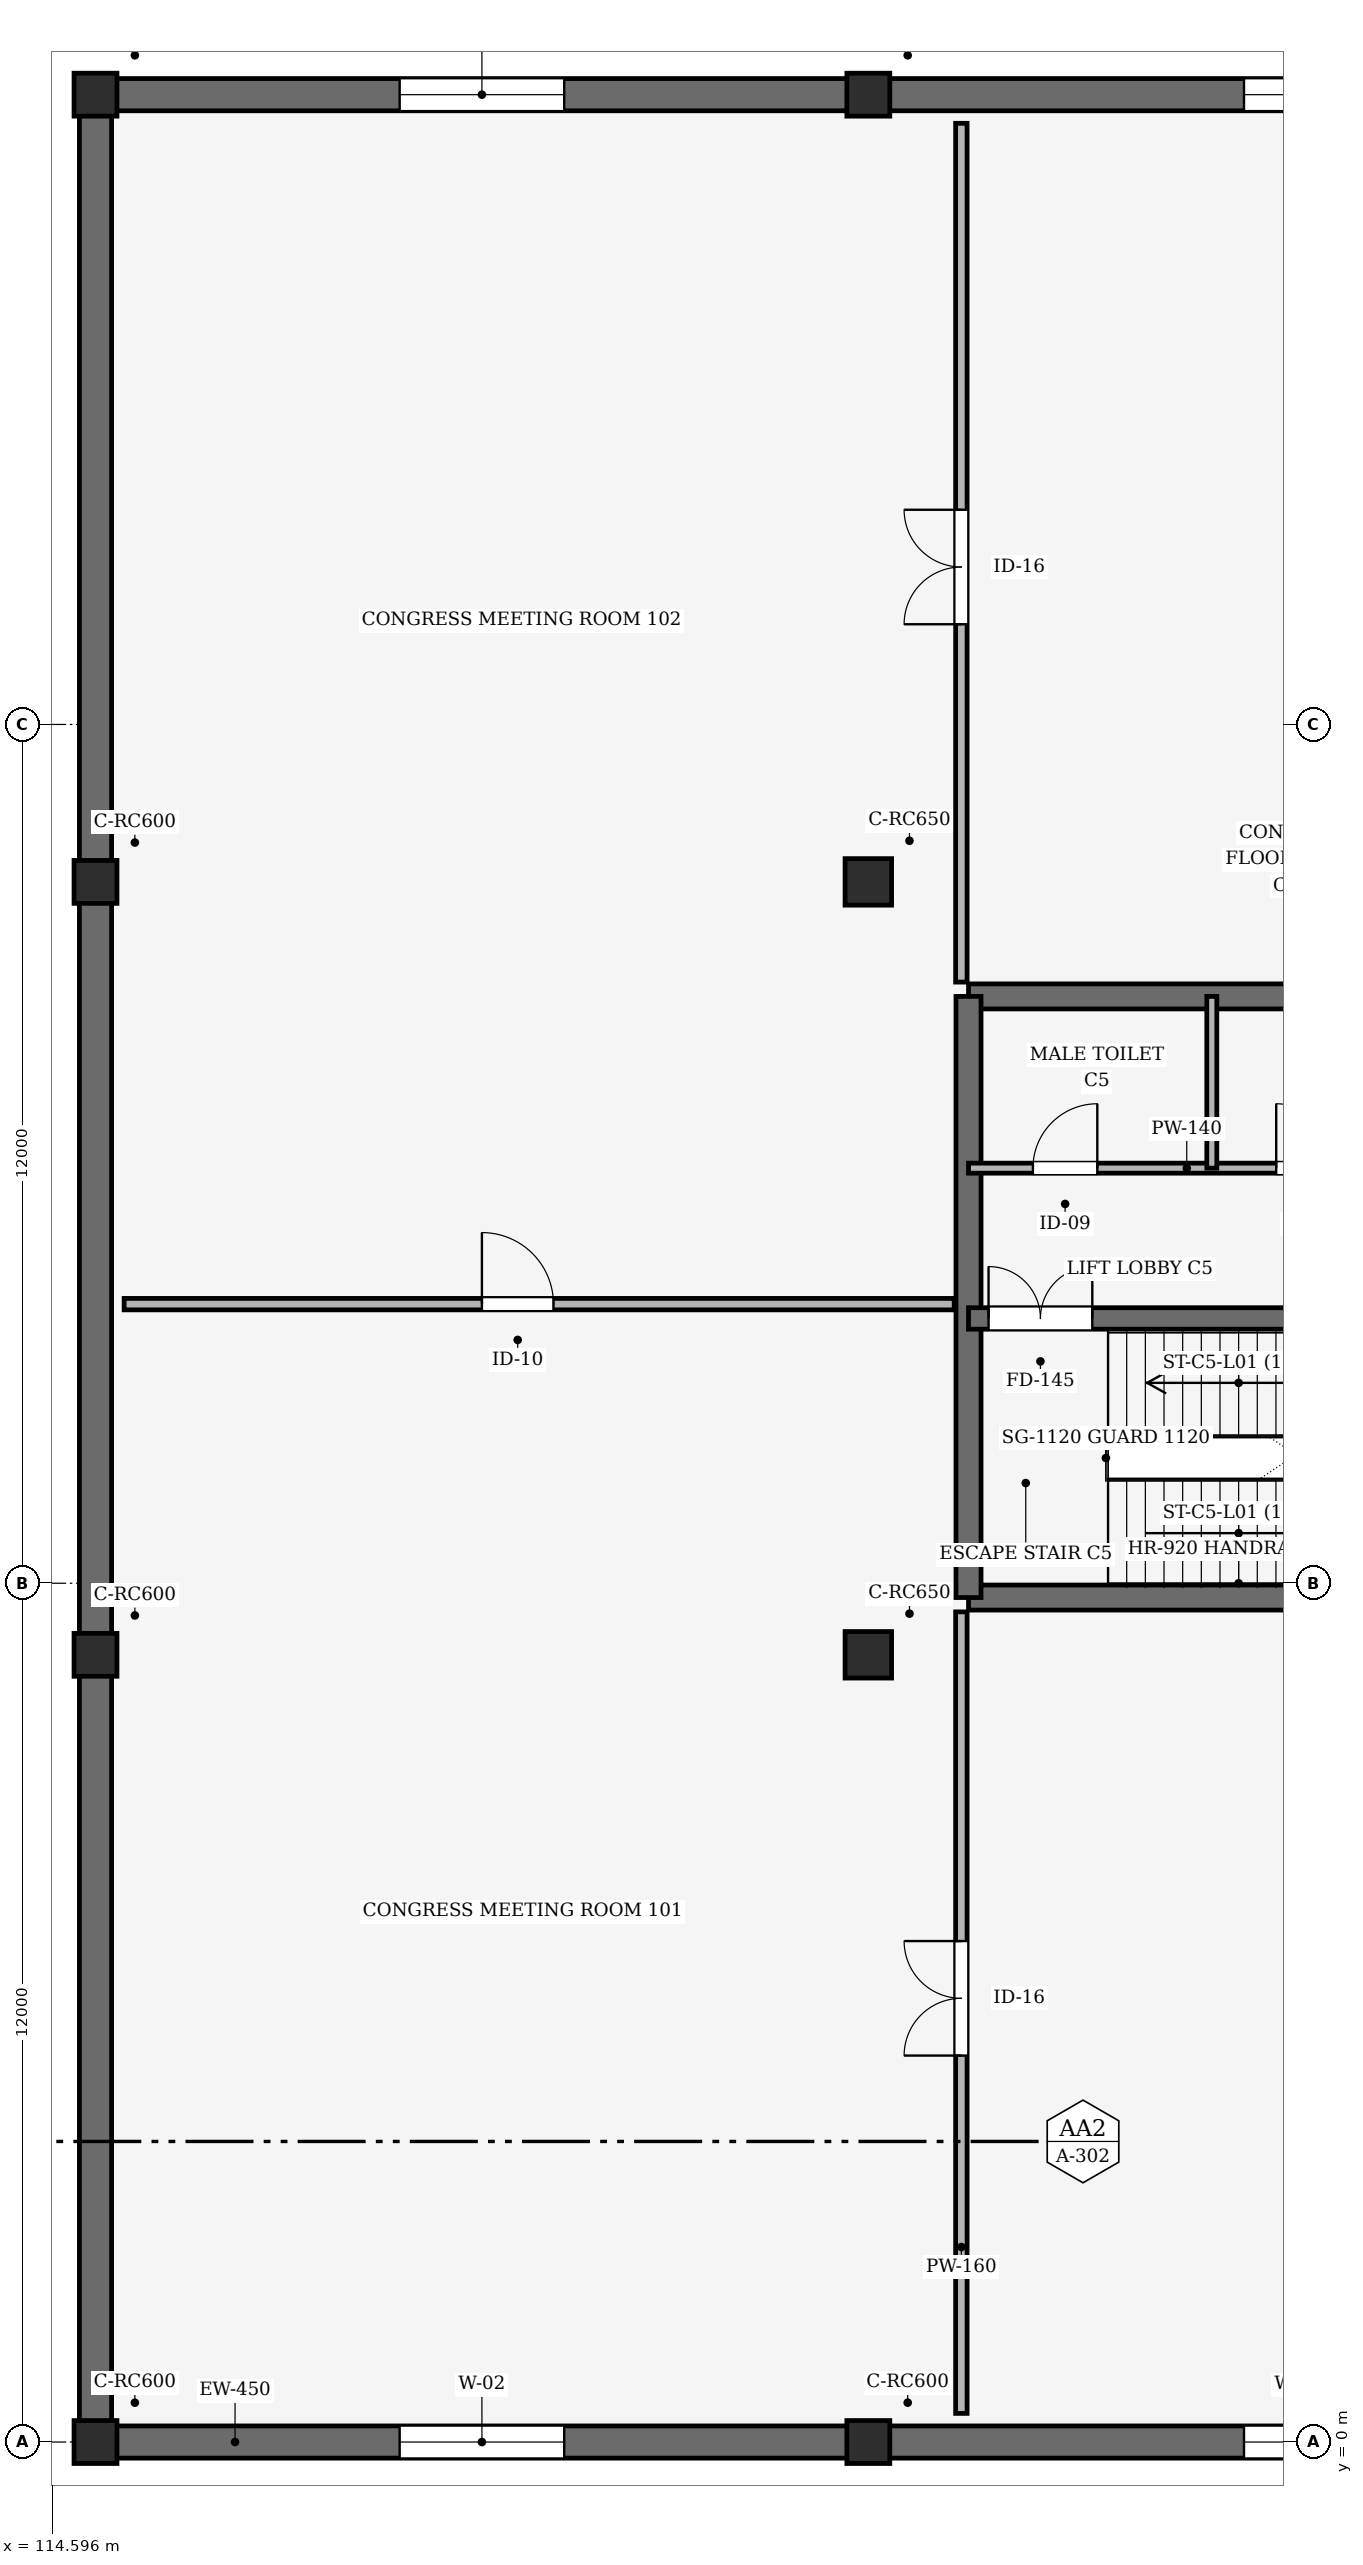
"""IFC4 building model, lengths in metres.
Left out: names, types, materials, properties, quantities, classifications, styles, units other than length and angle.
Written with IfcOpenShell. Run it as: python <this file> out.ifc"""

import sys

from ifc_helpers import new_model, si_unit, direction, frame, frame_2d, origin, origin_2d, place, context, subcontext, project, spatial, rectangle, extrude, element, fill, save


model = new_model("IFC4")
c1 = context("Model", 3, precision=1e-05, world=origin(), true_north=direction((0.0, 1.0)))
c2 = subcontext(c1, "Body", "Model", "MODEL_VIEW")
j1 = project(units=[si_unit("LENGTHUNIT", "METRE"), si_unit("PLANEANGLEUNIT", "RADIAN")], contexts=[c1])
p1 = place(None, origin())
s1 = spatial("IfcSite", under=j1, at=p1, CompositionType="ELEMENT")
p2 = place(p1, origin())
s2 = spatial("IfcBuilding", under=s1, at=p2, CompositionType="ELEMENT")
p3 = place(p2, frame((0.0, 0.0, 5.4)))
s3 = spatial("IfcBuildingStorey", under=s2, at=p3, CompositionType="ELEMENT", Elevation=5.4)
for number, where, z_axis, x_axis in (
    (1, (115.2, 0.0, 0.0), (0.0, 0.0, 1.0), (1.0, 0.0, 0.0)),
    (2, (115.2, 11.0, 0.0), (0.0, 0.0, 1.0), (1.0, 0.0, 0.0)),
    (3, (115.2, 21.8, 0.0), (0.0, 0.0, 1.0), (1.0, 0.0, 0.0)),
    (4, (115.2, 32.8, 0.0), (0.0, 0.0, 1.0), (1.0, 0.0, 0.0)),
    (5, (126.0, 0.0, 0.0), (0.0, 0.0, 1.0), (1.0, 0.0, 0.0)),
):
    element("IfcColumn", number, at=place(p3, frame(where, z_axis=z_axis, x_axis=x_axis)), inside=s3, PredefinedType="COLUMN", context=c2, shape_type="SweptSolid", body=[
        extrude(rectangle(XDim=0.6, YDim=0.6, at=origin_2d()), origin(), (0.0, 0.0, 1.0), 5.4),
    ])
for number, where, z_axis, x_axis in (
    (6, (126.0, 11.0, 0.0), (0.0, 0.0, 1.0), (1.0, 0.0, 0.0)),
    (7, (126.0, 21.8, 0.0), (0.0, 0.0, 1.0), (1.0, 0.0, 0.0)),
):
    element("IfcColumn", number, at=place(p3, frame(where, z_axis=z_axis, x_axis=x_axis)), inside=s3, PredefinedType="COLUMN", context=c2, shape_type="SweptSolid", body=[
        extrude(rectangle(XDim=0.65, YDim=0.65, at=origin_2d()), origin(), (0.0, 0.0, 1.0), 5.4),
    ])
p4 = place(p3, frame((126.0, 32.8, 0.0), z_axis=(0.0, 0.0, 1.0), x_axis=(1.0, 0.0, 0.0)))
e8 = element("IfcColumn", 8, at=p4, inside=s3, PredefinedType="COLUMN", context=c2, shape_type="SweptSolid", body=[
    extrude(rectangle(XDim=0.6, YDim=0.6, at=origin_2d()), origin(), (0.0, 0.0, 1.0), 5.4),
])
p5 = place(p3, frame((115.2, 0.0, 0.0), z_axis=(0.0, 0.0, 1.0), x_axis=(1.0, 0.0, 0.0)))
e9 = element("IfcWall", 9, at=p5, inside=s3, PredefinedType="SOLIDWALL", context=c2, shape_type="SweptSolid", body=[
    extrude(rectangle(XDim=10.8, YDim=0.45, at=frame_2d((5.4, 0.0))), origin(), (0.0, 0.0, 1.0), 4.3),
])
p6 = place(p5, frame((4.25, 0.0, 0.9)))
e10 = element("IfcOpeningElement", 10, at=p6, cuts=e9, PredefinedType="OPENING", context=c2, shape_type="SweptSolid", body=[
    extrude(rectangle(XDim=2.3, YDim=3.1, at=frame_2d((1.15, 1.55))), frame((0.0, 0.235, 0.0), z_axis=(0.0, -1.0, 0.0), x_axis=(1.0, 0.0, 0.0)), (0.0, 0.0, 1.0), 0.47),
])
p7 = place(p3, frame((126.0, 32.8, 0.0), z_axis=(0.0, 0.0, 1.0), x_axis=(-1.0, 0.0, 0.0)))
e11 = element("IfcWall", 11, at=p7, inside=s3, PredefinedType="SOLIDWALL", context=c2, shape_type="SweptSolid", body=[
    extrude(rectangle(XDim=10.8, YDim=0.45, at=frame_2d((5.4, 0.0))), origin(), (0.0, 0.0, 1.0), 4.3),
])
p8 = place(p7, frame((4.25, 0.0, 0.9)))
e12 = element("IfcOpeningElement", 12, at=p8, cuts=e11, PredefinedType="OPENING", context=c2, shape_type="SweptSolid", body=[
    extrude(rectangle(XDim=2.3, YDim=3.1, at=frame_2d((1.15, 1.55))), frame((0.0, 0.235, 0.0), z_axis=(0.0, -1.0, 0.0), x_axis=(1.0, 0.0, 0.0)), (0.0, 0.0, 1.0), 0.47),
])
p9 = place(p3, frame((126.0, 0.0, 0.0), z_axis=(0.0, 0.0, 1.0), x_axis=(1.0, 0.0, 0.0)))
e13 = element("IfcWall", 13, at=p9, inside=s3, PredefinedType="SOLIDWALL", context=c2, shape_type="SweptSolid", body=[
    extrude(rectangle(XDim=12.0, YDim=0.45, at=frame_2d((6.0, 0.0))), origin(), (0.0, 0.0, 1.0), 4.3),
])
p10 = place(p9, frame((5.25, 0.0, 0.9)))
e14 = element("IfcOpeningElement", 14, at=p10, cuts=e13, PredefinedType="OPENING", context=c2, shape_type="SweptSolid", body=[
    extrude(rectangle(XDim=1.5, YDim=2.15, at=frame_2d((0.75, 1.075))), frame((0.0, 0.235, 0.0), z_axis=(0.0, -1.0, 0.0), x_axis=(1.0, 0.0, 0.0)), (0.0, 0.0, 1.0), 0.47),
])
p11 = place(p3, frame((138.0, 32.8, 0.0), z_axis=(0.0, 0.0, 1.0), x_axis=(-1.0, 0.0, 0.0)))
e15 = element("IfcWall", 15, at=p11, inside=s3, PredefinedType="SOLIDWALL", context=c2, shape_type="SweptSolid", body=[
    extrude(rectangle(XDim=12.0, YDim=0.45, at=frame_2d((6.0, 0.0))), origin(), (0.0, 0.0, 1.0), 4.3),
])
p12 = place(p11, frame((5.25, 0.0, 0.9)))
e16 = element("IfcOpeningElement", 16, at=p12, cuts=e15, PredefinedType="OPENING", context=c2, shape_type="SweptSolid", body=[
    extrude(rectangle(XDim=1.5, YDim=2.15, at=frame_2d((0.75, 1.075))), frame((0.0, 0.235, 0.0), z_axis=(0.0, -1.0, 0.0), x_axis=(1.0, 0.0, 0.0)), (0.0, 0.0, 1.0), 0.47),
])
p13 = place(p3, frame((115.2, 11.0, 0.0), z_axis=(0.0, 0.0, 1.0), x_axis=(0.0, -1.0, 0.0)))
e17 = element("IfcWall", 17, at=p13, inside=s3, PredefinedType="SOLIDWALL", context=c2, shape_type="SweptSolid", body=[
    extrude(rectangle(XDim=11.0, YDim=0.45, at=frame_2d((5.5, 0.0))), origin(), (0.0, 0.0, 1.0), 4.3),
])
p14 = place(p3, frame((115.2, 21.8, 0.0), z_axis=(0.0, 0.0, 1.0), x_axis=(0.0, -1.0, 0.0)))
e18 = element("IfcWall", 18, at=p14, inside=s3, PredefinedType="SOLIDWALL", context=c2, shape_type="SweptSolid", body=[
    extrude(rectangle(XDim=10.8, YDim=0.45, at=frame_2d((5.4, 0.0))), origin(), (0.0, 0.0, 1.0), 4.3),
])
p15 = place(p3, frame((115.2, 32.8, 0.0), z_axis=(0.0, 0.0, 1.0), x_axis=(0.0, -1.0, 0.0)))
e19 = element("IfcWall", 19, at=p15, inside=s3, PredefinedType="SOLIDWALL", context=c2, shape_type="SweptSolid", body=[
    extrude(rectangle(XDim=11.0, YDim=0.45, at=frame_2d((5.5, 0.0))), origin(), (0.0, 0.0, 1.0), 4.3),
])
for number, where, z_axis, x_axis in (
    (20, (127.4, 11.8, 0.0), (0.0, 0.0, 1.0), (1.0, 0.0, 0.0)),
    (21, (137.6, 20.2, 0.0), (0.0, 0.0, 1.0), (-1.0, 0.0, 0.0)),
):
    element("IfcWall", number, at=place(p3, frame(where, z_axis=z_axis, x_axis=x_axis)), inside=s3, PredefinedType="SHEAR", context=c2, shape_type="SweptSolid", body=[
        extrude(rectangle(XDim=10.2, YDim=0.35, at=frame_2d((5.1, 0.0))), origin(), (0.0, 0.0, 1.0), 5.4),
    ])
p16 = place(p3, frame((127.4, 20.2, 0.0), z_axis=(0.0, 0.0, 1.0), x_axis=(0.0, -1.0, 0.0)))
e22 = element("IfcWall", 22, at=p16, inside=s3, PredefinedType="SHEAR", context=c2, shape_type="SweptSolid", body=[
    extrude(rectangle(XDim=8.4, YDim=0.35, at=frame_2d((4.2, 0.0))), origin(), (0.0, 0.0, 1.0), 5.4),
])
p17 = place(p3, frame((127.4, 15.7, 0.0), z_axis=(0.0, 0.0, 1.0), x_axis=(1.0, 0.0, 0.0)))
e23 = element("IfcWall", 23, at=p17, inside=s3, PredefinedType="SHEAR", context=c2, shape_type="SweptSolid", body=[
    extrude(rectangle(XDim=10.2, YDim=0.3, at=frame_2d((5.1, 0.0))), origin(), (0.0, 0.0, 1.0), 5.4),
])
p18 = place(p17, frame((0.28, 0.0, 0.0)))
e24 = element("IfcOpeningElement", 24, at=p18, cuts=e23, PredefinedType="OPENING", context=c2, shape_type="SweptSolid", body=[
    extrude(rectangle(XDim=1.45, YDim=2.15, at=frame_2d((0.725, 1.075))), frame((0.0, 0.16, 0.0), z_axis=(0.0, -1.0, 0.0), x_axis=(1.0, 0.0, 0.0)), (0.0, 0.0, 1.0), 0.32),
])
p19 = place(p17, frame((8.225, 0.0, 0.0)))
e25 = element("IfcOpeningElement", 25, at=p19, cuts=e23, PredefinedType="OPENING", context=c2, shape_type="SweptSolid", body=[
    extrude(rectangle(XDim=1.1, YDim=2.15, at=frame_2d((0.55, 1.075))), frame((0.0, 0.16, 0.0), z_axis=(0.0, -1.0, 0.0), x_axis=(1.0, 0.0, 0.0)), (0.0, 0.0, 1.0), 0.32),
])
p20 = place(p3, frame((127.4, 17.8, 0.0), z_axis=(0.0, 0.0, 1.0), x_axis=(1.0, 0.0, 0.0)))
e26 = element("IfcWall", 26, at=p20, inside=s3, PredefinedType="PARTITIONING", context=c2, shape_type="SweptSolid", body=[
    extrude(rectangle(XDim=10.2, YDim=0.14, at=frame_2d((5.1, 0.0))), origin(), (0.0, 0.0, 1.0), 4.5),
])
p21 = place(p20, frame((0.9, 0.0, 0.0)))
e27 = element("IfcOpeningElement", 27, at=p21, cuts=e26, PredefinedType="OPENING", context=c2, shape_type="SweptSolid", body=[
    extrude(rectangle(XDim=0.9, YDim=2.1, at=frame_2d((0.45, 1.05))), frame((0.0, 0.08, 0.0), z_axis=(0.0, -1.0, 0.0), x_axis=(1.0, 0.0, 0.0)), (0.0, 0.0, 1.0), 0.16),
])
p22 = place(p20, frame((4.3, 0.0, 0.0)))
e28 = element("IfcOpeningElement", 28, at=p22, cuts=e26, PredefinedType="OPENING", context=c2, shape_type="SweptSolid", body=[
    extrude(rectangle(XDim=0.9, YDim=2.1, at=frame_2d((0.45, 1.05))), frame((0.0, 0.08, 0.0), z_axis=(0.0, -1.0, 0.0), x_axis=(1.0, 0.0, 0.0)), (0.0, 0.0, 1.0), 0.16),
])
p23 = place(p20, frame((7.7, 0.0, 0.0)))
e29 = element("IfcOpeningElement", 29, at=p23, cuts=e26, PredefinedType="OPENING", context=c2, shape_type="SweptSolid", body=[
    extrude(rectangle(XDim=0.95, YDim=2.1, at=frame_2d((0.475, 1.05))), frame((0.0, 0.08, 0.0), z_axis=(0.0, -1.0, 0.0), x_axis=(1.0, 0.0, 0.0)), (0.0, 0.0, 1.0), 0.16),
])
p24 = place(p3, frame((130.8, 17.8, 0.0), z_axis=(0.0, 0.0, 1.0), x_axis=(0.0, 1.0, 0.0)))
e30 = element("IfcWall", 30, at=p24, inside=s3, PredefinedType="PARTITIONING", context=c2, shape_type="SweptSolid", body=[
    extrude(rectangle(XDim=2.4, YDim=0.14, at=frame_2d((1.2, 0.0))), origin(), (0.0, 0.0, 1.0), 4.5),
])
p25 = place(p3, frame((127.3, 0.4, 0.0), z_axis=(0.0, 0.0, 1.0), x_axis=(0.0, 1.0, 0.0)))
e31 = element("IfcWall", 31, at=p25, inside=s3, PredefinedType="PARTITIONING", context=c2, shape_type="SweptSolid", body=[
    extrude(rectangle(XDim=11.2, YDim=0.16, at=frame_2d((5.6, 0.0))), origin(), (0.0, 0.0, 1.0), 3.6),
])
p26 = place(p25, frame((5.0, 0.0, 0.0)))
e32 = element("IfcOpeningElement", 32, at=p26, cuts=e31, PredefinedType="OPENING", context=c2, shape_type="SweptSolid", body=[
    extrude(rectangle(XDim=1.6, YDim=2.2, at=frame_2d((0.8, 1.1))), frame((0.0, 0.09, 0.0), z_axis=(0.0, -1.0, 0.0), x_axis=(1.0, 0.0, 0.0)), (0.0, 0.0, 1.0), 0.18),
])
p27 = place(p3, frame((127.3, 20.4, 0.0), z_axis=(0.0, 0.0, 1.0), x_axis=(0.0, 1.0, 0.0)))
e33 = element("IfcWall", 33, at=p27, inside=s3, PredefinedType="PARTITIONING", context=c2, shape_type="SweptSolid", body=[
    extrude(rectangle(XDim=12.0, YDim=0.16, at=frame_2d((6.0, 0.0))), origin(), (0.0, 0.0, 1.0), 3.6),
])
p28 = place(p27, frame((5.0, 0.0, 0.0)))
e34 = element("IfcOpeningElement", 34, at=p28, cuts=e33, PredefinedType="OPENING", context=c2, shape_type="SweptSolid", body=[
    extrude(rectangle(XDim=1.6, YDim=2.2, at=frame_2d((0.8, 1.1))), frame((0.0, 0.09, 0.0), z_axis=(0.0, -1.0, 0.0), x_axis=(1.0, 0.0, 0.0)), (0.0, 0.0, 1.0), 0.18),
])
p29 = place(p3, frame((115.6, 15.9, 0.0), z_axis=(0.0, 0.0, 1.0), x_axis=(1.0, 0.0, 0.0)))
e35 = element("IfcWall", 35, at=p29, inside=s3, PredefinedType="PARTITIONING", context=c2, shape_type="SweptSolid", body=[
    extrude(rectangle(XDim=11.6, YDim=0.16, at=frame_2d((5.8, 0.0))), origin(), (0.0, 0.0, 1.0), 3.6),
])
p30 = place(p29, frame((5.0, 0.0, 0.0)))
e36 = element("IfcOpeningElement", 36, at=p30, cuts=e35, PredefinedType="OPENING", context=c2, shape_type="SweptSolid", body=[
    extrude(rectangle(XDim=1.0, YDim=2.15, at=frame_2d((0.5, 1.075))), frame((0.0, 0.09, 0.0), z_axis=(0.0, -1.0, 0.0), x_axis=(1.0, 0.0, 0.0)), (0.0, 0.0, 1.0), 0.18),
])
p31 = place(p6, origin())
e37 = element("IfcWindow", 37, at=p31, inside=s3, PartitioningType="DOUBLE_PANEL_VERTICAL", PredefinedType="WINDOW", context=c2, shape_type="SweptSolid", body=[
    extrude(rectangle(XDim=2.3, YDim=3.1, at=frame_2d((1.15, 1.55))), frame((0.0, 0.03, 0.0), z_axis=(0.0, -1.0, 0.0), x_axis=(1.0, 0.0, 0.0)), (0.0, 0.0, 1.0), 0.06),
])
fill(e10, e37)
p32 = place(p8, origin())
e38 = element("IfcWindow", 38, at=p32, inside=s3, PartitioningType="DOUBLE_PANEL_VERTICAL", PredefinedType="WINDOW", context=c2, shape_type="SweptSolid", body=[
    extrude(rectangle(XDim=2.3, YDim=3.1, at=frame_2d((1.15, 1.55))), frame((0.0, 0.03, 0.0), z_axis=(0.0, -1.0, 0.0), x_axis=(1.0, 0.0, 0.0)), (0.0, 0.0, 1.0), 0.06),
])
fill(e12, e38)
p33 = place(p10, origin())
e39 = element("IfcWindow", 39, at=p33, inside=s3, PartitioningType="DOUBLE_PANEL_VERTICAL", PredefinedType="WINDOW", context=c2, shape_type="SweptSolid", body=[
    extrude(rectangle(XDim=1.5, YDim=2.15, at=frame_2d((0.75, 1.075))), frame((0.0, 0.03, 0.0), z_axis=(0.0, -1.0, 0.0), x_axis=(1.0, 0.0, 0.0)), (0.0, 0.0, 1.0), 0.06),
])
fill(e14, e39)
p34 = place(p12, origin())
e40 = element("IfcWindow", 40, at=p34, inside=s3, PartitioningType="DOUBLE_PANEL_VERTICAL", PredefinedType="WINDOW", context=c2, shape_type="SweptSolid", body=[
    extrude(rectangle(XDim=1.5, YDim=2.15, at=frame_2d((0.75, 1.075))), frame((0.0, 0.03, 0.0), z_axis=(0.0, -1.0, 0.0), x_axis=(1.0, 0.0, 0.0)), (0.0, 0.0, 1.0), 0.06),
])
fill(e16, e40)
p35 = place(p18, origin())
e41 = element("IfcDoor", 41, at=p35, inside=s3, OperationType="DOUBLE_DOOR_SINGLE_SWING", PredefinedType="DOOR", context=c2, shape_type="SweptSolid", body=[
    extrude(rectangle(XDim=1.45, YDim=2.15, at=frame_2d((0.725, 1.075))), frame((0.0, 0.025, 0.0), z_axis=(0.0, -1.0, 0.0), x_axis=(1.0, 0.0, 0.0)), (0.0, 0.0, 1.0), 0.05),
])
fill(e24, e41)
p36 = place(p21, origin())
e42 = element("IfcDoor", 42, at=p36, inside=s3, OperationType="SINGLE_SWING_RIGHT", PredefinedType="DOOR", context=c2, shape_type="SweptSolid", body=[
    extrude(rectangle(XDim=0.9, YDim=2.1, at=frame_2d((0.45, 1.05))), frame((0.0, 0.025, 0.0), z_axis=(0.0, -1.0, 0.0), x_axis=(1.0, 0.0, 0.0)), (0.0, 0.0, 1.0), 0.05),
])
fill(e27, e42)
p37 = place(p22, origin())
e43 = element("IfcDoor", 43, at=p37, inside=s3, OperationType="SINGLE_SWING_LEFT", PredefinedType="DOOR", context=c2, shape_type="SweptSolid", body=[
    extrude(rectangle(XDim=0.9, YDim=2.1, at=frame_2d((0.45, 1.05))), frame((0.0, 0.025, 0.0), z_axis=(0.0, -1.0, 0.0), x_axis=(1.0, 0.0, 0.0)), (0.0, 0.0, 1.0), 0.05),
])
fill(e28, e43)
p38 = place(p26, origin())
e44 = element("IfcDoor", 44, at=p38, inside=s3, OperationType="DOUBLE_DOOR_SINGLE_SWING", PredefinedType="DOOR", context=c2, shape_type="SweptSolid", body=[
    extrude(rectangle(XDim=1.6, YDim=2.2, at=frame_2d((0.8, 1.1))), frame((0.0, 0.025, 0.0), z_axis=(0.0, -1.0, 0.0), x_axis=(1.0, 0.0, 0.0)), (0.0, 0.0, 1.0), 0.05),
])
fill(e32, e44)
p39 = place(p28, origin())
e45 = element("IfcDoor", 45, at=p39, inside=s3, OperationType="DOUBLE_DOOR_SINGLE_SWING", PredefinedType="DOOR", context=c2, shape_type="SweptSolid", body=[
    extrude(rectangle(XDim=1.6, YDim=2.2, at=frame_2d((0.8, 1.1))), frame((0.0, 0.025, 0.0), z_axis=(0.0, -1.0, 0.0), x_axis=(1.0, 0.0, 0.0)), (0.0, 0.0, 1.0), 0.05),
])
fill(e34, e45)
p40 = place(p30, origin())
e46 = element("IfcDoor", 46, at=p40, inside=s3, OperationType="SINGLE_SWING_LEFT", PredefinedType="DOOR", context=c2, shape_type="SweptSolid", body=[
    extrude(rectangle(XDim=1.0, YDim=2.15, at=frame_2d((0.5, 1.075))), frame((0.0, 0.025, 0.0), z_axis=(0.0, -1.0, 0.0), x_axis=(1.0, 0.0, 0.0)), (0.0, 0.0, 1.0), 0.05),
])
fill(e36, e46)
save(model, sys.argv[1])
